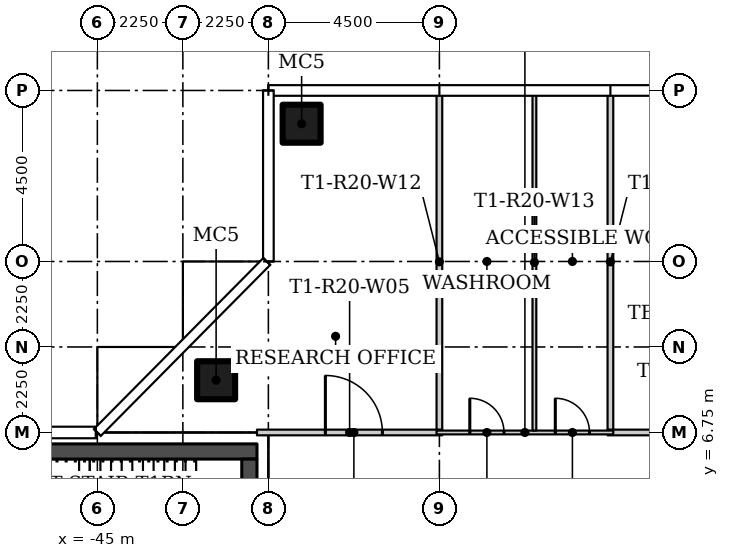
"""IFC4 building model, lengths in metres.
Left out: names, types, materials, properties, quantities, classifications, styles, units other than length and angle.
Written with IfcOpenShell. Run it as: python <this file> out.ifc"""

import sys

from ifc_helpers import new_model, si_unit, direction, frame, frame_2d, origin, origin_2d, place, context, subcontext, project, spatial, rectangle, hollow_rectangle, extrude, element, fill, save


model = new_model("IFC4")
c1 = context("Model", 3, precision=1e-05, world=origin(), true_north=direction((0.0, 1.0)))
c2 = subcontext(c1, "Body", "Model", "MODEL_VIEW")
j1 = project(units=[si_unit("LENGTHUNIT", "METRE"), si_unit("PLANEANGLEUNIT", "RADIAN")], contexts=[c1])
p1 = place(None, origin())
s1 = spatial("IfcSite", under=j1, at=p1, CompositionType="ELEMENT")
p2 = place(p1, origin())
s2 = spatial("IfcBuilding", under=s1, at=p2, CompositionType="ELEMENT")
p3 = place(p2, frame((0.0, 0.0, 182.7)))
s3 = spatial("IfcBuildingStorey", under=s2, at=p3, CompositionType="ELEMENT", Elevation=182.7)
for number, where in (
    (1, (-41.875, 8.125, 0.0)),
    (2, (-39.625, 14.875, 0.0)),
):
    element("IfcColumn", number, at=place(p3, frame(where)), inside=s3, PredefinedType="COLUMN", context=c2, shape_type="SweptSolid", body=[
        extrude(hollow_rectangle(XDim=1.0, YDim=1.0, WallThickness=0.04, at=origin_2d()), origin(), (0.0, 0.0, 1.0), 3.55),
    ])
p4 = place(p3, frame((-40.8, 6.75, 0.0)))
e3 = element("IfcWall", 3, at=p4, inside=s3, PredefinedType="PARTITIONING", context=c2, shape_type="SweptSolid", body=[
    extrude(rectangle(XDim=4.875, YDim=0.15, at=frame_2d((2.438, 0.0))), origin(), (0.0, 0.0, 1.0), 3.55),
])
p5 = place(p4, frame((1.8, 0.0, 0.0)))
e4 = element("IfcOpeningElement", 4, at=p5, cuts=e3, PredefinedType="OPENING", context=c2, shape_type="SweptSolid", body=[
    extrude(rectangle(XDim=1.5, YDim=2.1, at=frame_2d((0.75, 1.05))), frame((0.0, 0.085, 0.0), z_axis=(0.0, -1.0, 0.0), x_axis=(1.0, 0.0, 0.0)), (0.0, 0.0, 1.0), 0.17),
])
p6 = place(p3, frame((-31.575, 6.75, 0.0)))
e5 = element("IfcWall", 5, at=p6, inside=s3, PredefinedType="PARTITIONING", context=c2, shape_type="SweptSolid", body=[
    extrude(rectangle(XDim=4.875, YDim=0.15, at=frame_2d((2.438, 0.0))), origin(), (0.0, 0.0, 1.0), 3.55),
])
p7 = place(p6, frame((1.575, 0.0, 0.0)))
e6 = element("IfcOpeningElement", 6, at=p7, cuts=e5, PredefinedType="OPENING", context=c2, shape_type="SweptSolid", body=[
    extrude(rectangle(XDim=1.5, YDim=2.1, at=frame_2d((0.75, 1.05))), frame((0.0, 0.085, 0.0), z_axis=(0.0, -1.0, 0.0), x_axis=(1.0, 0.0, 0.0)), (0.0, 0.0, 1.0), 0.17),
])
p8 = place(p3, frame((-36.075, 6.75, 0.0)))
e7 = element("IfcWall", 7, at=p8, inside=s3, PredefinedType="PARTITIONING", context=c2, shape_type="SweptSolid", body=[
    extrude(rectangle(XDim=4.65, YDim=0.1, at=frame_2d((2.325, 0.0))), origin(), (0.0, 0.0, 1.0), 3.55),
])
p9 = place(p8, frame((0.875, 0.0, 0.0)))
e8 = element("IfcOpeningElement", 8, at=p9, cuts=e7, PredefinedType="OPENING", context=c2, shape_type="SweptSolid", body=[
    extrude(rectangle(XDim=0.9, YDim=2.1, at=frame_2d((0.45, 1.05))), frame((0.0, 0.06, 0.0), z_axis=(0.0, -1.0, 0.0), x_axis=(1.0, 0.0, 0.0)), (0.0, 0.0, 1.0), 0.12),
])
p10 = place(p8, frame((3.125, 0.0, 0.0)))
e9 = element("IfcOpeningElement", 9, at=p10, cuts=e7, PredefinedType="OPENING", context=c2, shape_type="SweptSolid", body=[
    extrude(rectangle(XDim=0.9, YDim=2.1, at=frame_2d((0.45, 1.05))), frame((0.0, 0.06, 0.0), z_axis=(0.0, -1.0, 0.0), x_axis=(1.0, 0.0, 0.0)), (0.0, 0.0, 1.0), 0.12),
])
p11 = place(p3, frame((-36.0, 6.825, 0.0), z_axis=(0.0, 0.0, 1.0), x_axis=(0.0, 1.0, 0.0)))
e10 = element("IfcWall", 10, at=p11, inside=s3, PredefinedType="PARTITIONING", context=c2, shape_type="SweptSolid", body=[
    extrude(rectangle(XDim=8.83, YDim=0.15, at=frame_2d((4.415, 0.0))), origin(), (0.0, 0.0, 1.0), 3.55),
])
p12 = place(p3, frame((-33.5, 6.8, 0.0), z_axis=(0.0, 0.0, 1.0), x_axis=(0.0, 1.0, 0.0)))
e11 = element("IfcWall", 11, at=p12, inside=s3, PredefinedType="PARTITIONING", context=c2, shape_type="SweptSolid", body=[
    extrude(rectangle(XDim=8.855, YDim=0.1, at=frame_2d((4.427, 0.0))), origin(), (0.0, 0.0, 1.0), 3.55),
])
p13 = place(p3, frame((-31.5, 6.825, 0.0), z_axis=(0.0, 0.0, 1.0), x_axis=(0.0, 1.0, 0.0)))
e12 = element("IfcWall", 12, at=p13, inside=s3, PredefinedType="PARTITIONING", context=c2, shape_type="SweptSolid", body=[
    extrude(rectangle(XDim=8.83, YDim=0.15, at=frame_2d((4.415, 0.0))), origin(), (0.0, 0.0, 1.0), 3.55),
])
p14 = place(p3, frame((-40.8, 6.25, 0.0), z_axis=(0.0, 0.0, 1.0), x_axis=(-1.0, 0.0, 0.0)))
e13 = element("IfcWall", 13, at=p14, inside=s3, PredefinedType="SHEAR", context=c2, shape_type="SweptSolid", body=[
    extrude(rectangle(XDim=12.9, YDim=0.4, at=frame_2d((6.45, 0.0))), origin(), (0.0, 0.0, 1.0), 3.55),
])
p15 = place(p3, frame((-41.0, -6.05, 0.0), z_axis=(0.0, 0.0, 1.0), x_axis=(0.0, 1.0, 0.0)))
e14 = element("IfcWall", 14, at=p15, inside=s3, PredefinedType="SHEAR", context=c2, shape_type="SweptSolid", body=[
    extrude(rectangle(XDim=12.1, YDim=0.4, at=frame_2d((6.05, 0.0))), origin(), (0.0, 0.0, 1.0), 3.55),
])
p16 = place(p15, frame((6.4, 0.0, 0.0)))
e15 = element("IfcOpeningElement", 15, at=p16, cuts=e14, PredefinedType="OPENING", context=c2, shape_type="SweptSolid", body=[
    extrude(rectangle(XDim=1.8, YDim=2.4, at=frame_2d((0.9, 1.2))), frame((0.0, 0.21, 0.0), z_axis=(0.0, -1.0, 0.0), x_axis=(1.0, 0.0, 0.0)), (0.0, 0.0, 1.0), 0.42),
])
p17 = place(p5, origin())
e16 = element("IfcDoor", 16, at=p17, inside=s3, OperationType="DOUBLE_DOOR_SINGLE_SWING", PredefinedType="DOOR", context=c2, shape_type="SweptSolid", body=[
    extrude(rectangle(XDim=1.5, YDim=2.1, at=frame_2d((0.75, 1.05))), frame((0.0, 0.025, 0.0), z_axis=(0.0, -1.0, 0.0), x_axis=(1.0, 0.0, 0.0)), (0.0, 0.0, 1.0), 0.05),
])
fill(e4, e16)
p18 = place(p9, origin())
e17 = element("IfcDoor", 17, at=p18, inside=s3, OperationType="SINGLE_SWING_RIGHT", PredefinedType="DOOR", context=c2, shape_type="SweptSolid", body=[
    extrude(rectangle(XDim=0.9, YDim=2.1, at=frame_2d((0.45, 1.05))), frame((0.0, 0.025, 0.0), z_axis=(0.0, -1.0, 0.0), x_axis=(1.0, 0.0, 0.0)), (0.0, 0.0, 1.0), 0.05),
])
fill(e8, e17)
p19 = place(p10, origin())
e18 = element("IfcDoor", 18, at=p19, inside=s3, OperationType="SINGLE_SWING_RIGHT", PredefinedType="DOOR", context=c2, shape_type="SweptSolid", body=[
    extrude(rectangle(XDim=0.9, YDim=2.1, at=frame_2d((0.45, 1.05))), frame((0.0, 0.025, 0.0), z_axis=(0.0, -1.0, 0.0), x_axis=(1.0, 0.0, 0.0)), (0.0, 0.0, 1.0), 0.05),
])
fill(e9, e18)
save(model, sys.argv[1])
